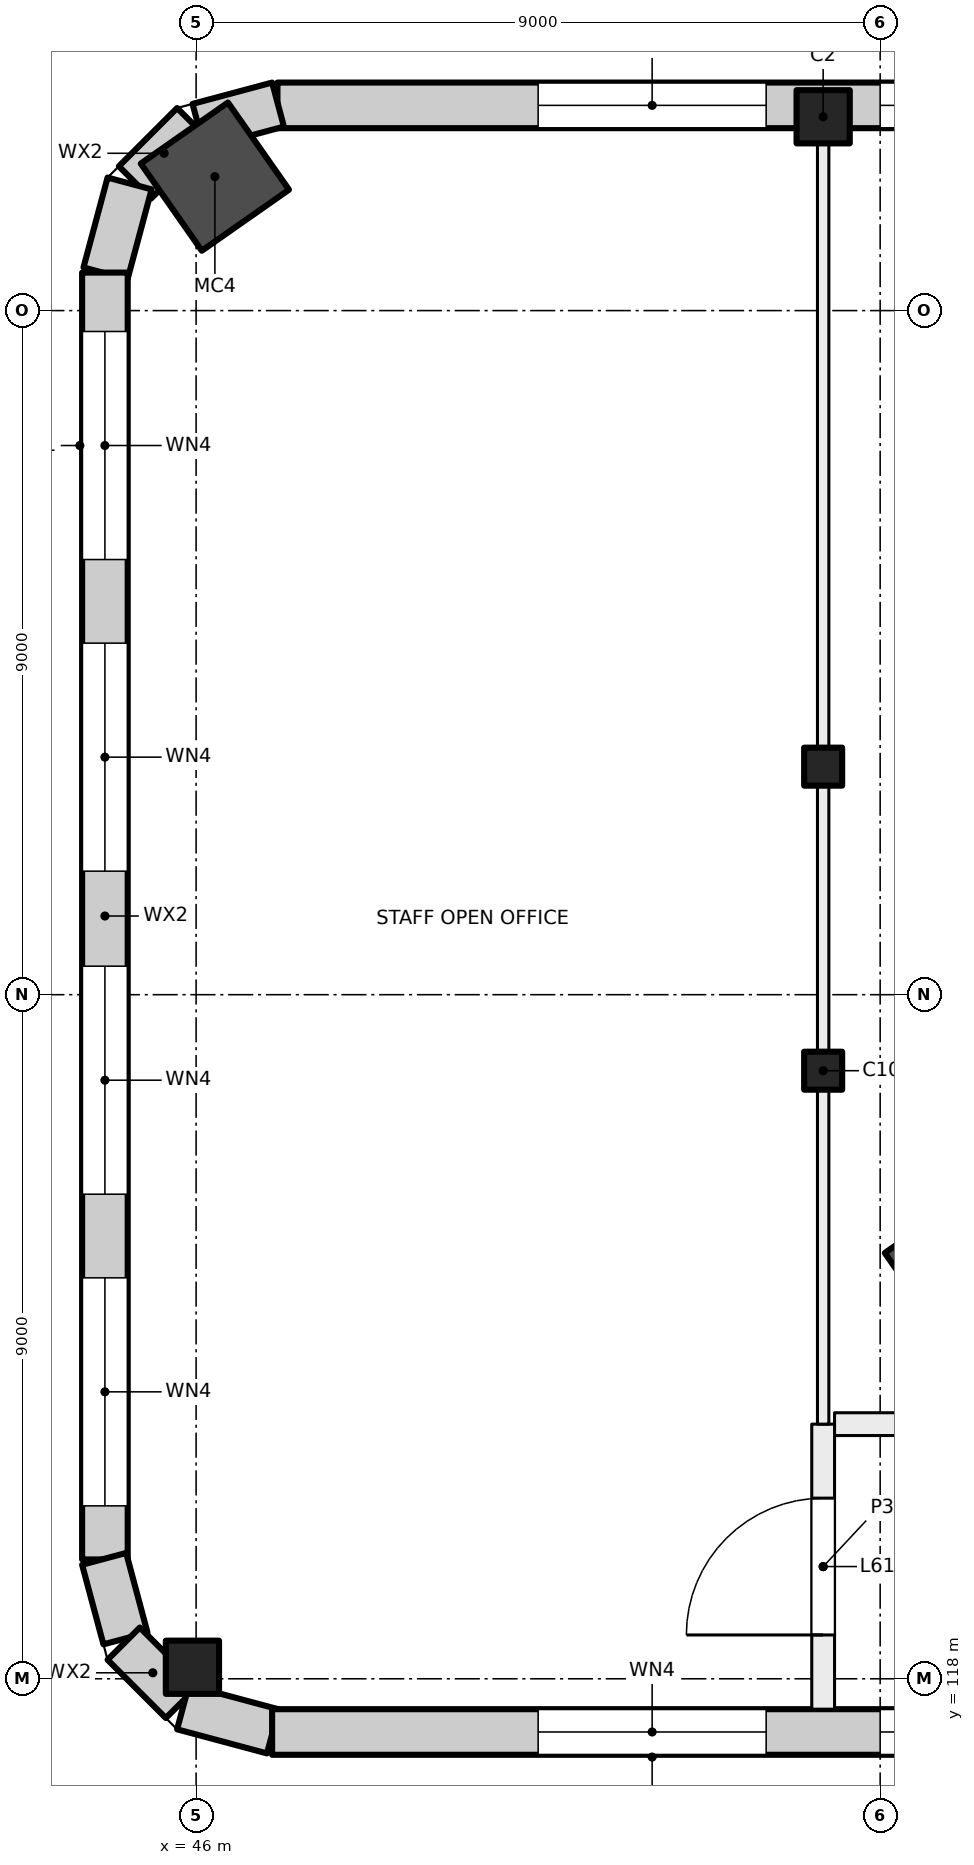
"""IFC4 building model, lengths in metres.
Left out: names, types, materials, properties, quantities, classifications, styles, units other than length and angle.
Written with IfcOpenShell. Run it as: python <this file> out.ifc"""

import sys

from ifc_helpers import new_model, si_unit, direction, frame, frame_2d, origin, origin_2d, place, context, subcontext, project, spatial, rectangle, hollow_rectangle, extrude, element, fill, save


model = new_model("IFC4")
c1 = context("Model", 3, precision=1e-05, world=origin(), true_north=direction((0.0, 1.0)))
c2 = subcontext(c1, "Body", "Model", "MODEL_VIEW")
j1 = project(units=[si_unit("LENGTHUNIT", "METRE"), si_unit("PLANEANGLEUNIT", "RADIAN")], contexts=[c1])
p1 = place(None, origin())
s1 = spatial("IfcSite", under=j1, at=p1, CompositionType="ELEMENT")
p2 = place(p1, origin())
s2 = spatial("IfcBuilding", under=s1, at=p2, CompositionType="ELEMENT")
p3 = place(p2, frame((0.0, 0.0, 257.5)))
s3 = spatial("IfcBuildingStorey", under=s2, at=p3, CompositionType="ELEMENT", Elevation=257.5)
for number, where, z_axis, x_axis in (
    (1, (46.247, 137.762, 0.0), (0.0, 0.0, 1.0), (0.574, -0.819, 0.0)),
    (2, (56.036, 123.43, 0.0), (0.0, 0.0, 1.0), (0.574, -0.819, 0.0)),
):
    element("IfcColumn", number, at=place(p3, frame(where, z_axis=z_axis, x_axis=x_axis)), inside=s3, PredefinedType="COLUMN", context=c2, shape_type="SweptSolid", body=[
        extrude(hollow_rectangle(XDim=1.4, YDim=1.4, WallThickness=0.025, at=origin_2d()), origin(), (0.0, 0.0, 1.0), 4.0),
    ])
for number, where, z_axis, x_axis in (
    (3, (54.25, 130.0, 0.0), (0.0, 0.0, 1.0), (1.0, 0.0, 0.0)),
    (4, (54.25, 126.0, 0.0), (0.0, 0.0, 1.0), (1.0, 0.0, 0.0)),
):
    element("IfcColumn", number, at=place(p3, frame(where, z_axis=z_axis, x_axis=x_axis)), inside=s3, PredefinedType="COLUMN", context=c2, shape_type="SweptSolid", body=[
        extrude(rectangle(XDim=0.5, YDim=0.5, at=origin_2d()), origin(), (0.0, 0.0, 1.0), 4.0),
    ])
for number, where, z_axis, x_axis in (
    (5, (54.25, 138.55, 0.0), (0.0, 0.0, 1.0), (1.0, 0.0, 0.0)),
    (6, (45.952, 118.152, 0.0), (0.0, 0.0, 1.0), (1.0, 0.0, 0.0)),
):
    element("IfcColumn", number, at=place(p3, frame(where, z_axis=z_axis, x_axis=x_axis)), inside=s3, PredefinedType="COLUMN", context=c2, shape_type="SweptSolid", body=[
        extrude(rectangle(XDim=0.7, YDim=0.7, at=origin_2d()), origin(), (0.0, 0.0, 1.0), 4.0),
    ])
p4 = place(p3, frame((47.07, 138.7, 0.0), z_axis=(0.0, 0.0, 1.0), x_axis=(1.0, 0.0, 0.0)))
e7 = element("IfcWall", 7, at=p4, inside=s3, PredefinedType="SOLIDWALL", context=c2, shape_type="SweptSolid", body=[
    extrude(rectangle(XDim=43.91, YDim=0.6, at=frame_2d((21.955, 0.0))), origin(), (0.0, 0.0, 1.0), 3.625),
])
p5 = place(p4, frame((3.43, 0.0, 0.9)))
e8 = element("IfcOpeningElement", 8, at=p5, cuts=e7, PredefinedType="OPENING", context=c2, shape_type="SweptSolid", body=[
    extrude(rectangle(XDim=3.0, YDim=2.4, at=frame_2d((1.5, 1.2))), frame((0.0, 0.31, 0.0), z_axis=(0.0, -1.0, 0.0), x_axis=(1.0, 0.0, 0.0)), (0.0, 0.0, 1.0), 0.62),
])
p6 = place(p4, frame((7.93, 0.0, 0.9)))
e9 = element("IfcOpeningElement", 9, at=p6, cuts=e7, PredefinedType="OPENING", context=c2, shape_type="SweptSolid", body=[
    extrude(rectangle(XDim=3.0, YDim=2.4, at=frame_2d((1.5, 1.2))), frame((0.0, 0.31, 0.0), z_axis=(0.0, -1.0, 0.0), x_axis=(1.0, 0.0, 0.0)), (0.0, 0.0, 1.0), 0.62),
])
p7 = place(p4, frame((12.43, 0.0, 0.9)))
e10 = element("IfcOpeningElement", 10, at=p7, cuts=e7, PredefinedType="OPENING", context=c2, shape_type="SweptSolid", body=[
    extrude(rectangle(XDim=3.0, YDim=2.4, at=frame_2d((1.5, 1.2))), frame((0.0, 0.31, 0.0), z_axis=(0.0, -1.0, 0.0), x_axis=(1.0, 0.0, 0.0)), (0.0, 0.0, 1.0), 0.62),
])
p8 = place(p4, frame((16.93, 0.0, 0.9)))
e11 = element("IfcOpeningElement", 11, at=p8, cuts=e7, PredefinedType="OPENING", context=c2, shape_type="SweptSolid", body=[
    extrude(rectangle(XDim=3.0, YDim=2.4, at=frame_2d((1.5, 1.2))), frame((0.0, 0.31, 0.0), z_axis=(0.0, -1.0, 0.0), x_axis=(1.0, 0.0, 0.0)), (0.0, 0.0, 1.0), 0.62),
])
p9 = place(p4, frame((21.43, 0.0, 0.9)))
e12 = element("IfcOpeningElement", 12, at=p9, cuts=e7, PredefinedType="OPENING", context=c2, shape_type="SweptSolid", body=[
    extrude(rectangle(XDim=3.0, YDim=2.4, at=frame_2d((1.5, 1.2))), frame((0.0, 0.31, 0.0), z_axis=(0.0, -1.0, 0.0), x_axis=(1.0, 0.0, 0.0)), (0.0, 0.0, 1.0), 0.62),
])
p10 = place(p4, frame((25.93, 0.0, 0.9)))
e13 = element("IfcOpeningElement", 13, at=p10, cuts=e7, PredefinedType="OPENING", context=c2, shape_type="SweptSolid", body=[
    extrude(rectangle(XDim=3.0, YDim=2.4, at=frame_2d((1.5, 1.2))), frame((0.0, 0.31, 0.0), z_axis=(0.0, -1.0, 0.0), x_axis=(1.0, 0.0, 0.0)), (0.0, 0.0, 1.0), 0.62),
])
p11 = place(p4, frame((30.43, 0.0, 0.9)))
e14 = element("IfcOpeningElement", 14, at=p11, cuts=e7, PredefinedType="OPENING", context=c2, shape_type="SweptSolid", body=[
    extrude(rectangle(XDim=3.0, YDim=2.4, at=frame_2d((1.5, 1.2))), frame((0.0, 0.31, 0.0), z_axis=(0.0, -1.0, 0.0), x_axis=(1.0, 0.0, 0.0)), (0.0, 0.0, 1.0), 0.62),
])
p12 = place(p4, frame((34.93, 0.0, 0.9)))
e15 = element("IfcOpeningElement", 15, at=p12, cuts=e7, PredefinedType="OPENING", context=c2, shape_type="SweptSolid", body=[
    extrude(rectangle(XDim=3.0, YDim=2.4, at=frame_2d((1.5, 1.2))), frame((0.0, 0.31, 0.0), z_axis=(0.0, -1.0, 0.0), x_axis=(1.0, 0.0, 0.0)), (0.0, 0.0, 1.0), 0.62),
])
p13 = place(p4, frame((39.43, 0.0, 0.9)))
e16 = element("IfcOpeningElement", 16, at=p13, cuts=e7, PredefinedType="OPENING", context=c2, shape_type="SweptSolid", body=[
    extrude(rectangle(XDim=3.0, YDim=2.4, at=frame_2d((1.5, 1.2))), frame((0.0, 0.31, 0.0), z_axis=(0.0, -1.0, 0.0), x_axis=(1.0, 0.0, 0.0)), (0.0, 0.0, 1.0), 0.62),
])
p14 = place(p3, frame((46.031, 138.43, 0.0), z_axis=(0.0, 0.0, 1.0), x_axis=(0.965939004864, 0.25876985698, 0.0)))
e17 = element("IfcWall", 17, at=p14, inside=s3, PredefinedType="SOLIDWALL", context=c2, shape_type="SweptSolid", body=[
    extrude(rectangle(XDim=1.084, YDim=0.6, at=frame_2d((0.542, 0.0))), origin(), (0.0, 0.0, 1.0), 3.625),
])
p15 = place(p3, frame((45.196, 137.686, 0.0), z_axis=(0.0, 0.0, 1.0), x_axis=(0.707106781187, 0.707106781187, 0.0)))
e18 = element("IfcWall", 18, at=p15, inside=s3, PredefinedType="SOLIDWALL", context=c2, shape_type="SweptSolid", body=[
    extrude(rectangle(XDim=1.084, YDim=0.6, at=frame_2d((0.542, 0.0))), origin(), (0.0, 0.0, 1.0), 3.625),
])
p16 = place(p3, frame((44.808, 136.49, 0.0), z_axis=(0.0, 0.0, 1.0), x_axis=(0.258878975098, 0.965909766102, 0.0)))
e19 = element("IfcWall", 19, at=p16, inside=s3, PredefinedType="SOLIDWALL", context=c2, shape_type="SweptSolid", body=[
    extrude(rectangle(XDim=1.224, YDim=0.6, at=frame_2d((0.612, 0.0))), origin(), (0.0, 0.0, 1.0), 3.625),
])
p17 = place(p3, frame((44.8, 119.57, 0.0), z_axis=(0.0, 0.0, 1.0), x_axis=(0.0, 1.0, 0.0)))
e20 = element("IfcWall", 20, at=p17, inside=s3, PredefinedType="SOLIDWALL", context=c2, shape_type="SweptSolid", body=[
    extrude(rectangle(XDim=16.93, YDim=0.6, at=frame_2d((8.465, 0.0))), origin(), (0.0, 0.0, 1.0), 3.625),
])
p18 = place(p17, frame((0.705, 0.0, 0.9)))
e21 = element("IfcOpeningElement", 21, at=p18, cuts=e20, PredefinedType="OPENING", context=c2, shape_type="SweptSolid", body=[
    extrude(rectangle(XDim=3.0, YDim=2.4, at=frame_2d((1.5, 1.2))), frame((0.0, 0.31, 0.0), z_axis=(0.0, -1.0, 0.0), x_axis=(1.0, 0.0, 0.0)), (0.0, 0.0, 1.0), 0.62),
])
p19 = place(p17, frame((4.805, 0.0, 0.9)))
e22 = element("IfcOpeningElement", 22, at=p19, cuts=e20, PredefinedType="OPENING", context=c2, shape_type="SweptSolid", body=[
    extrude(rectangle(XDim=3.0, YDim=2.4, at=frame_2d((1.5, 1.2))), frame((0.0, 0.31, 0.0), z_axis=(0.0, -1.0, 0.0), x_axis=(1.0, 0.0, 0.0)), (0.0, 0.0, 1.0), 0.62),
])
p20 = place(p17, frame((9.055, 0.0, 0.9)))
e23 = element("IfcOpeningElement", 23, at=p20, cuts=e20, PredefinedType="OPENING", context=c2, shape_type="SweptSolid", body=[
    extrude(rectangle(XDim=3.0, YDim=2.4, at=frame_2d((1.5, 1.2))), frame((0.0, 0.31, 0.0), z_axis=(0.0, -1.0, 0.0), x_axis=(1.0, 0.0, 0.0)), (0.0, 0.0, 1.0), 0.62),
])
p21 = place(p17, frame((13.155, 0.0, 0.9)))
e24 = element("IfcOpeningElement", 24, at=p21, cuts=e20, PredefinedType="OPENING", context=c2, shape_type="SweptSolid", body=[
    extrude(rectangle(XDim=3.0, YDim=2.4, at=frame_2d((1.5, 1.2))), frame((0.0, 0.31, 0.0), z_axis=(0.0, -1.0, 0.0), x_axis=(1.0, 0.0, 0.0)), (0.0, 0.0, 1.0), 0.62),
])
p22 = place(p3, frame((45.07, 118.531, 0.0), z_axis=(0.0, 0.0, 1.0), x_axis=(-0.25876985698, 0.965939004864, 0.0)))
e25 = element("IfcWall", 25, at=p22, inside=s3, PredefinedType="SOLIDWALL", context=c2, shape_type="SweptSolid", body=[
    extrude(rectangle(XDim=1.084, YDim=0.6, at=frame_2d((0.542, 0.0))), origin(), (0.0, 0.0, 1.0), 3.625),
])
p23 = place(p3, frame((45.814, 117.696, 0.0), z_axis=(0.0, 0.0, 1.0), x_axis=(-0.707106781187, 0.707106781187, 0.0)))
e26 = element("IfcWall", 26, at=p23, inside=s3, PredefinedType="SOLIDWALL", context=c2, shape_type="SweptSolid", body=[
    extrude(rectangle(XDim=1.084, YDim=0.6, at=frame_2d((0.542, 0.0))), origin(), (0.0, 0.0, 1.0), 3.625),
])
p24 = place(p3, frame((47.01, 117.308, 0.0), z_axis=(0.0, 0.0, 1.0), x_axis=(-0.965909766102, 0.258878975098, 0.0)))
e27 = element("IfcWall", 27, at=p24, inside=s3, PredefinedType="SOLIDWALL", context=c2, shape_type="SweptSolid", body=[
    extrude(rectangle(XDim=1.224, YDim=0.6, at=frame_2d((0.612, 0.0))), origin(), (0.0, 0.0, 1.0), 3.625),
])
p25 = place(p3, frame((90.98, 117.3, 0.0), z_axis=(0.0, 0.0, 1.0), x_axis=(-1.0, 0.0, 0.0)))
e28 = element("IfcWall", 28, at=p25, inside=s3, PredefinedType="SOLIDWALL", context=c2, shape_type="SweptSolid", body=[
    extrude(rectangle(XDim=43.98, YDim=0.6, at=frame_2d((21.99, 0.0))), origin(), (0.0, 0.0, 1.0), 3.625),
])
p26 = place(p25, frame((1.48, 0.0, 0.9)))
e29 = element("IfcOpeningElement", 29, at=p26, cuts=e28, PredefinedType="OPENING", context=c2, shape_type="SweptSolid", body=[
    extrude(rectangle(XDim=3.0, YDim=2.4, at=frame_2d((1.5, 1.2))), frame((0.0, 0.31, 0.0), z_axis=(0.0, -1.0, 0.0), x_axis=(1.0, 0.0, 0.0)), (0.0, 0.0, 1.0), 0.62),
])
p27 = place(p25, frame((5.98, 0.0, 0.9)))
e30 = element("IfcOpeningElement", 30, at=p27, cuts=e28, PredefinedType="OPENING", context=c2, shape_type="SweptSolid", body=[
    extrude(rectangle(XDim=3.0, YDim=2.4, at=frame_2d((1.5, 1.2))), frame((0.0, 0.31, 0.0), z_axis=(0.0, -1.0, 0.0), x_axis=(1.0, 0.0, 0.0)), (0.0, 0.0, 1.0), 0.62),
])
p28 = place(p25, frame((10.48, 0.0, 0.9)))
e31 = element("IfcOpeningElement", 31, at=p28, cuts=e28, PredefinedType="OPENING", context=c2, shape_type="SweptSolid", body=[
    extrude(rectangle(XDim=3.0, YDim=2.4, at=frame_2d((1.5, 1.2))), frame((0.0, 0.31, 0.0), z_axis=(0.0, -1.0, 0.0), x_axis=(1.0, 0.0, 0.0)), (0.0, 0.0, 1.0), 0.62),
])
p29 = place(p25, frame((14.98, 0.0, 0.9)))
e32 = element("IfcOpeningElement", 32, at=p29, cuts=e28, PredefinedType="OPENING", context=c2, shape_type="SweptSolid", body=[
    extrude(rectangle(XDim=3.0, YDim=2.4, at=frame_2d((1.5, 1.2))), frame((0.0, 0.31, 0.0), z_axis=(0.0, -1.0, 0.0), x_axis=(1.0, 0.0, 0.0)), (0.0, 0.0, 1.0), 0.62),
])
p30 = place(p25, frame((19.48, 0.0, 0.9)))
e33 = element("IfcOpeningElement", 33, at=p30, cuts=e28, PredefinedType="OPENING", context=c2, shape_type="SweptSolid", body=[
    extrude(rectangle(XDim=3.0, YDim=2.4, at=frame_2d((1.5, 1.2))), frame((0.0, 0.31, 0.0), z_axis=(0.0, -1.0, 0.0), x_axis=(1.0, 0.0, 0.0)), (0.0, 0.0, 1.0), 0.62),
])
p31 = place(p25, frame((23.98, 0.0, 0.9)))
e34 = element("IfcOpeningElement", 34, at=p31, cuts=e28, PredefinedType="OPENING", context=c2, shape_type="SweptSolid", body=[
    extrude(rectangle(XDim=3.0, YDim=2.4, at=frame_2d((1.5, 1.2))), frame((0.0, 0.31, 0.0), z_axis=(0.0, -1.0, 0.0), x_axis=(1.0, 0.0, 0.0)), (0.0, 0.0, 1.0), 0.62),
])
p32 = place(p25, frame((28.48, 0.0, 0.9)))
e35 = element("IfcOpeningElement", 35, at=p32, cuts=e28, PredefinedType="OPENING", context=c2, shape_type="SweptSolid", body=[
    extrude(rectangle(XDim=3.0, YDim=2.4, at=frame_2d((1.5, 1.2))), frame((0.0, 0.31, 0.0), z_axis=(0.0, -1.0, 0.0), x_axis=(1.0, 0.0, 0.0)), (0.0, 0.0, 1.0), 0.62),
])
p33 = place(p25, frame((32.98, 0.0, 0.9)))
e36 = element("IfcOpeningElement", 36, at=p33, cuts=e28, PredefinedType="OPENING", context=c2, shape_type="SweptSolid", body=[
    extrude(rectangle(XDim=3.0, YDim=2.4, at=frame_2d((1.5, 1.2))), frame((0.0, 0.31, 0.0), z_axis=(0.0, -1.0, 0.0), x_axis=(1.0, 0.0, 0.0)), (0.0, 0.0, 1.0), 0.62),
])
p34 = place(p25, frame((37.48, 0.0, 0.9)))
e37 = element("IfcOpeningElement", 37, at=p34, cuts=e28, PredefinedType="OPENING", context=c2, shape_type="SweptSolid", body=[
    extrude(rectangle(XDim=3.0, YDim=2.4, at=frame_2d((1.5, 1.2))), frame((0.0, 0.31, 0.0), z_axis=(0.0, -1.0, 0.0), x_axis=(1.0, 0.0, 0.0)), (0.0, 0.0, 1.0), 0.62),
])
p35 = place(p3, frame((54.25, 117.6, 0.0), z_axis=(0.0, 0.0, 1.0), x_axis=(0.0, 1.0, 0.0)))
e38 = element("IfcWall", 38, at=p35, inside=s3, PredefinedType="PARTITIONING", context=c2, shape_type="SweptSolid", body=[
    extrude(rectangle(XDim=3.75, YDim=0.3, at=frame_2d((1.875, 0.0))), origin(), (0.0, 0.0, 1.0), 3.625),
])
p36 = place(p35, frame((0.977, 0.0, 0.0)))
e39 = element("IfcOpeningElement", 39, at=p36, cuts=e38, PredefinedType="OPENING", context=c2, shape_type="SweptSolid", body=[
    extrude(rectangle(XDim=1.8, YDim=2.1, at=frame_2d((0.9, 1.05))), frame((0.0, 0.16, 0.0), z_axis=(0.0, -1.0, 0.0), x_axis=(1.0, 0.0, 0.0)), (0.0, 0.0, 1.0), 0.32),
])
p37 = place(p3, frame((54.4, 121.35, 0.0), z_axis=(0.0, 0.0, 1.0), x_axis=(1.0, 0.0, 0.0)))
e40 = element("IfcWall", 40, at=p37, inside=s3, PredefinedType="PARTITIONING", context=c2, shape_type="SweptSolid", body=[
    extrude(rectangle(XDim=31.425, YDim=0.3, at=frame_2d((15.712, 0.0))), origin(), (0.0, 0.0, 1.0), 3.625),
])
p38 = place(p37, frame((18.95, 0.0, 0.0)))
e41 = element("IfcOpeningElement", 41, at=p38, cuts=e40, PredefinedType="OPENING", context=c2, shape_type="SweptSolid", body=[
    extrude(rectangle(XDim=0.8, YDim=2.1, at=frame_2d((0.4, 1.05))), frame((0.0, 0.16, 0.0), z_axis=(0.0, -1.0, 0.0), x_axis=(1.0, 0.0, 0.0)), (0.0, 0.0, 1.0), 0.32),
])
p39 = place(p37, frame((25.2, 0.0, 0.0)))
e42 = element("IfcOpeningElement", 42, at=p39, cuts=e40, PredefinedType="OPENING", context=c2, shape_type="SweptSolid", body=[
    extrude(rectangle(XDim=1.8, YDim=2.1, at=frame_2d((0.9, 1.05))), frame((0.0, 0.16, 0.0), z_axis=(0.0, -1.0, 0.0), x_axis=(1.0, 0.0, 0.0)), (0.0, 0.0, 1.0), 0.32),
])
p40 = place(p37, frame((12.85, 0.0, 0.0)))
e43 = element("IfcOpeningElement", 43, at=p40, cuts=e40, PredefinedType="OPENING", context=c2, shape_type="SweptSolid", body=[
    extrude(rectangle(XDim=1.0, YDim=2.1, at=frame_2d((0.5, 1.05))), frame((0.0, 0.16, 0.0), z_axis=(0.0, -1.0, 0.0), x_axis=(1.0, 0.0, 0.0)), (0.0, 0.0, 1.0), 0.32),
])
p41 = place(p37, frame((3.515, 0.0, 0.0)))
e44 = element("IfcOpeningElement", 44, at=p41, cuts=e40, PredefinedType="OPENING", context=c2, shape_type="SweptSolid", body=[
    extrude(rectangle(XDim=1.8, YDim=2.1, at=frame_2d((0.9, 1.05))), frame((0.0, 0.16, 0.0), z_axis=(0.0, -1.0, 0.0), x_axis=(1.0, 0.0, 0.0)), (0.0, 0.0, 1.0), 0.32),
])
p42 = place(p3, frame((54.25, 138.4, 0.0), z_axis=(0.0, 0.0, 1.0), x_axis=(0.0, -1.0, 0.0)))
e45 = element("IfcWall", 45, at=p42, inside=s3, PredefinedType="PARTITIONING", context=c2, shape_type="SweptSolid", body=[
    extrude(rectangle(XDim=17.05, YDim=0.15, at=frame_2d((8.525, 0.0))), origin(), (0.0, 0.0, 1.0), 3.625),
])
p43 = place(p5, origin())
e46 = element("IfcWindow", 46, at=p43, inside=s3, PartitioningType="SINGLE_PANEL", PredefinedType="WINDOW", context=c2, shape_type="SweptSolid", body=[
    extrude(rectangle(XDim=3.0, YDim=2.4, at=frame_2d((1.5, 1.2))), frame((0.0, 0.03, 0.0), z_axis=(0.0, -1.0, 0.0), x_axis=(1.0, 0.0, 0.0)), (0.0, 0.0, 1.0), 0.06),
])
fill(e8, e46)
p44 = place(p6, origin())
e47 = element("IfcWindow", 47, at=p44, inside=s3, PartitioningType="SINGLE_PANEL", PredefinedType="WINDOW", context=c2, shape_type="SweptSolid", body=[
    extrude(rectangle(XDim=3.0, YDim=2.4, at=frame_2d((1.5, 1.2))), frame((0.0, 0.03, 0.0), z_axis=(0.0, -1.0, 0.0), x_axis=(1.0, 0.0, 0.0)), (0.0, 0.0, 1.0), 0.06),
])
fill(e9, e47)
p45 = place(p18, origin())
e48 = element("IfcWindow", 48, at=p45, inside=s3, PartitioningType="SINGLE_PANEL", PredefinedType="WINDOW", context=c2, shape_type="SweptSolid", body=[
    extrude(rectangle(XDim=3.0, YDim=2.4, at=frame_2d((1.5, 1.2))), frame((0.0, 0.03, 0.0), z_axis=(0.0, -1.0, 0.0), x_axis=(1.0, 0.0, 0.0)), (0.0, 0.0, 1.0), 0.06),
])
fill(e21, e48)
p46 = place(p19, origin())
e49 = element("IfcWindow", 49, at=p46, inside=s3, PartitioningType="SINGLE_PANEL", PredefinedType="WINDOW", context=c2, shape_type="SweptSolid", body=[
    extrude(rectangle(XDim=3.0, YDim=2.4, at=frame_2d((1.5, 1.2))), frame((0.0, 0.03, 0.0), z_axis=(0.0, -1.0, 0.0), x_axis=(1.0, 0.0, 0.0)), (0.0, 0.0, 1.0), 0.06),
])
fill(e22, e49)
p47 = place(p20, origin())
e50 = element("IfcWindow", 50, at=p47, inside=s3, PartitioningType="SINGLE_PANEL", PredefinedType="WINDOW", context=c2, shape_type="SweptSolid", body=[
    extrude(rectangle(XDim=3.0, YDim=2.4, at=frame_2d((1.5, 1.2))), frame((0.0, 0.03, 0.0), z_axis=(0.0, -1.0, 0.0), x_axis=(1.0, 0.0, 0.0)), (0.0, 0.0, 1.0), 0.06),
])
fill(e23, e50)
p48 = place(p21, origin())
e51 = element("IfcWindow", 51, at=p48, inside=s3, PartitioningType="SINGLE_PANEL", PredefinedType="WINDOW", context=c2, shape_type="SweptSolid", body=[
    extrude(rectangle(XDim=3.0, YDim=2.4, at=frame_2d((1.5, 1.2))), frame((0.0, 0.03, 0.0), z_axis=(0.0, -1.0, 0.0), x_axis=(1.0, 0.0, 0.0)), (0.0, 0.0, 1.0), 0.06),
])
fill(e24, e51)
p49 = place(p33, origin())
e52 = element("IfcWindow", 52, at=p49, inside=s3, PartitioningType="SINGLE_PANEL", PredefinedType="WINDOW", context=c2, shape_type="SweptSolid", body=[
    extrude(rectangle(XDim=3.0, YDim=2.4, at=frame_2d((1.5, 1.2))), frame((0.0, 0.03, 0.0), z_axis=(0.0, -1.0, 0.0), x_axis=(1.0, 0.0, 0.0)), (0.0, 0.0, 1.0), 0.06),
])
fill(e36, e52)
p50 = place(p34, origin())
e53 = element("IfcWindow", 53, at=p50, inside=s3, PartitioningType="SINGLE_PANEL", PredefinedType="WINDOW", context=c2, shape_type="SweptSolid", body=[
    extrude(rectangle(XDim=3.0, YDim=2.4, at=frame_2d((1.5, 1.2))), frame((0.0, 0.03, 0.0), z_axis=(0.0, -1.0, 0.0), x_axis=(1.0, 0.0, 0.0)), (0.0, 0.0, 1.0), 0.06),
])
fill(e37, e53)
p51 = place(p36, origin())
e54 = element("IfcDoor", 54, at=p51, inside=s3, OperationType="DOUBLE_DOOR_SINGLE_SWING", PredefinedType="DOOR", context=c2, shape_type="SweptSolid", body=[
    extrude(rectangle(XDim=1.8, YDim=2.1, at=frame_2d((0.9, 1.05))), frame((0.0, 0.025, 0.0), z_axis=(0.0, -1.0, 0.0), x_axis=(1.0, 0.0, 0.0)), (0.0, 0.0, 1.0), 0.05),
])
fill(e39, e54)
save(model, sys.argv[1])
